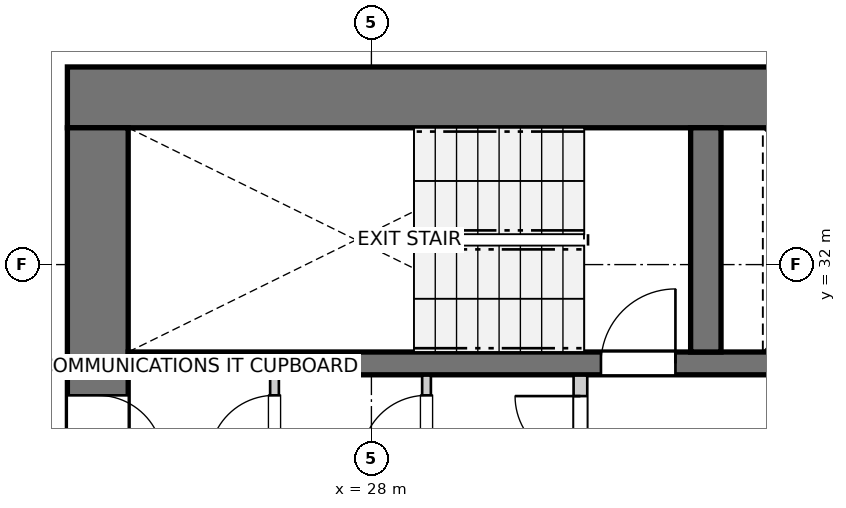
"""IFC4 building model, lengths in metres.
Left out: names, types, materials, properties, quantities, classifications, styles, units other than length and angle.
Written with IfcOpenShell. Run it as: python <this file> out.ifc"""

import sys

from ifc_helpers import new_model, si_unit, direction, frame, frame_2d, origin, place, context, subcontext, project, spatial, rectangle, extrude, source, transform, mapped, element, fill, save


model = new_model("IFC4")
c1 = context("Model", 3, precision=1e-05, world=origin(), true_north=direction((0.0, 1.0)))
c2 = subcontext(c1, "Body", "Model", "MODEL_VIEW")
j1 = project(units=[si_unit("LENGTHUNIT", "METRE"), si_unit("PLANEANGLEUNIT", "RADIAN")], contexts=[c1])
p1 = place(None, origin())
s1 = spatial("IfcSite", under=j1, at=p1, CompositionType="ELEMENT")
p2 = place(p1, origin())
s2 = spatial("IfcBuilding", under=s1, at=p2, CompositionType="ELEMENT")
p3 = place(p2, frame((0.0, 0.0, 27.0)))
s3 = spatial("IfcBuildingStorey", under=s2, at=p3, CompositionType="ELEMENT", Elevation=27.0)
p4 = place(p3, frame((36.7, 34.2, 0.0), z_axis=(0.0, 0.0, 1.0), x_axis=(-1.0, 0.0, 0.0)))
e1 = element("IfcWall", 1, at=p4, inside=s3, PredefinedType="SHEAR", context=c2, shape_type="SweptSolid", body=[
    extrude(rectangle(XDim=12.7, YDim=0.8, at=frame_2d((6.35, 0.0))), origin(), (0.0, 0.0, 1.0), 2.935),
])
p5 = place(p3, frame((24.4, 33.8, 0.0), z_axis=(0.0, 0.0, 1.0), x_axis=(0.0, -1.0, 0.0)))
e2 = element("IfcWall", 2, at=p5, inside=s3, PredefinedType="SHEAR", context=c2, shape_type="SweptSolid", body=[
    extrude(rectangle(XDim=15.6, YDim=0.8, at=frame_2d((7.8, 0.0))), origin(), (0.0, 0.0, 1.0), 2.935),
])
p6 = place(p5, frame((7.05, 0.0, 0.0)))
e3 = element("IfcOpeningElement", 3, at=p6, cuts=e2, PredefinedType="OPENING", context=c2, shape_type="SweptSolid", body=[
    extrude(rectangle(XDim=1.5, YDim=2.15, at=frame_2d((0.75, 1.075))), frame((0.0, 0.41, 0.0), z_axis=(0.0, -1.0, 0.0), x_axis=(1.0, 0.0, 0.0)), (0.0, 0.0, 1.0), 0.82),
])
p7 = place(p5, frame((3.52, 0.0, 0.0)))
e4 = element("IfcOpeningElement", 4, at=p7, cuts=e2, PredefinedType="OPENING", context=c2, shape_type="SweptSolid", body=[
    extrude(rectangle(XDim=0.86, YDim=2.05, at=frame_2d((0.43, 1.025))), frame((0.0, 0.41, 0.0), z_axis=(0.0, -1.0, 0.0), x_axis=(1.0, 0.0, 0.0)), (0.0, 0.0, 1.0), 0.82),
])
p8 = place(p5, frame((11.22, 0.0, 0.0)))
e5 = element("IfcOpeningElement", 5, at=p8, cuts=e2, PredefinedType="OPENING", context=c2, shape_type="SweptSolid", body=[
    extrude(rectangle(XDim=0.86, YDim=2.05, at=frame_2d((0.43, 1.025))), frame((0.0, 0.41, 0.0), z_axis=(0.0, -1.0, 0.0), x_axis=(1.0, 0.0, 0.0)), (0.0, 0.0, 1.0), 0.82),
])
p9 = place(p3, frame((24.8, 30.7, 0.0), z_axis=(0.0, 0.0, 1.0), x_axis=(1.0, 0.0, 0.0)))
e6 = element("IfcWall", 6, at=p9, inside=s3, PredefinedType="SHEAR", context=c2, shape_type="SweptSolid", body=[
    extrude(rectangle(XDim=11.1, YDim=0.3, at=frame_2d((5.55, 0.0))), origin(), (0.0, 0.0, 1.0), 2.935),
])
p10 = place(p9, frame((6.22, 0.0, 0.0)))
e7 = element("IfcOpeningElement", 7, at=p10, cuts=e6, PredefinedType="OPENING", context=c2, shape_type="SweptSolid", body=[
    extrude(rectangle(XDim=0.98, YDim=2.15, at=frame_2d((0.49, 1.075))), frame((0.0, 0.16, 0.0), z_axis=(0.0, -1.0, 0.0), x_axis=(1.0, 0.0, 0.0)), (0.0, 0.0, 1.0), 0.32),
])
p11 = place(p9, frame((9.15, 0.0, 0.0)))
e8 = element("IfcOpeningElement", 8, at=p11, cuts=e6, PredefinedType="OPENING", context=c2, shape_type="SweptSolid", body=[
    extrude(rectangle(XDim=1.15, YDim=2.15, at=frame_2d((0.575, 1.075))), frame((0.0, 0.16, 0.0), z_axis=(0.0, -1.0, 0.0), x_axis=(1.0, 0.0, 0.0)), (0.0, 0.0, 1.0), 0.32),
])
p12 = place(p3, frame((32.4, 30.85, 0.0), z_axis=(0.0, 0.0, 1.0), x_axis=(0.0, 1.0, 0.0)))
e9 = element("IfcWall", 9, at=p12, inside=s3, PredefinedType="SHEAR", context=c2, shape_type="SweptSolid", body=[
    extrude(rectangle(XDim=2.95, YDim=0.4, at=frame_2d((1.475, 0.0))), origin(), (0.0, 0.0, 1.0), 2.935),
])
p13 = place(p3, frame((30.75, 27.43, 0.0), z_axis=(0.0, 0.0, 1.0), x_axis=(0.0, 1.0, 0.0)))
e10 = element("IfcWall", 10, at=p13, inside=s3, PredefinedType="PARTITIONING", context=c2, shape_type="SweptSolid", body=[
    extrude(rectangle(XDim=3.11, YDim=0.18, at=frame_2d((1.555, 0.0))), origin(), (0.0, 0.0, 1.0), 2.935),
])
p14 = place(p13, frame((1.98, 0.0, 0.0)))
e11 = element("IfcOpeningElement", 11, at=p14, cuts=e10, PredefinedType="OPENING", context=c2, shape_type="SweptSolid", body=[
    extrude(rectangle(XDim=0.86, YDim=2.05, at=frame_2d((0.43, 1.025))), frame((0.0, 0.1, 0.0), z_axis=(0.0, -1.0, 0.0), x_axis=(1.0, 0.0, 0.0)), (0.0, 0.0, 1.0), 0.2),
])
p15 = place(p3, frame((26.725, 29.16, 0.0), z_axis=(0.0, 0.0, 1.0), x_axis=(0.0, 1.0, 0.0)))
e12 = element("IfcWall", 12, at=p15, inside=s3, PredefinedType="PARTITIONING", context=c2, shape_type="SweptSolid", body=[
    extrude(rectangle(XDim=1.38, YDim=0.115, at=frame_2d((0.69, 0.0))), origin(), (0.0, 0.0, 1.0), 2.935),
])
p16 = place(p15, frame((0.26, 0.0, 0.0)))
e13 = element("IfcOpeningElement", 13, at=p16, cuts=e12, PredefinedType="OPENING", context=c2, shape_type="SweptSolid", body=[
    extrude(rectangle(XDim=0.86, YDim=2.05, at=frame_2d((0.43, 1.025))), frame((0.0, 0.067, 0.0), z_axis=(0.0, -1.0, 0.0), x_axis=(1.0, 0.0, 0.0)), (0.0, 0.0, 1.0), 0.135),
])
p17 = place(p3, frame((28.725, 29.16, 0.0), z_axis=(0.0, 0.0, 1.0), x_axis=(0.0, 1.0, 0.0)))
e14 = element("IfcWall", 14, at=p17, inside=s3, PredefinedType="PARTITIONING", context=c2, shape_type="SweptSolid", body=[
    extrude(rectangle(XDim=1.38, YDim=0.115, at=frame_2d((0.69, 0.0))), origin(), (0.0, 0.0, 1.0), 2.935),
])
p18 = place(p17, frame((0.26, 0.0, 0.0)))
e15 = element("IfcOpeningElement", 15, at=p18, cuts=e14, PredefinedType="OPENING", context=c2, shape_type="SweptSolid", body=[
    extrude(rectangle(XDim=0.86, YDim=2.05, at=frame_2d((0.43, 1.025))), frame((0.0, 0.067, 0.0), z_axis=(0.0, -1.0, 0.0), x_axis=(1.0, 0.0, 0.0)), (0.0, 0.0, 1.0), 0.135),
])
m1 = source(origin(), c2, "Body", "SweptSolid", [
    extrude(rectangle(XDim=0.98, YDim=2.15, at=frame_2d((0.49, 1.075))), frame((0.0, 0.025, 0.0), z_axis=(0.0, -1.0, 0.0), x_axis=(1.0, 0.0, 0.0)), (0.0, 0.0, 1.0), 0.05),
])
p19 = place(p10, origin())
e16 = element("IfcDoor", 16, at=p19, inside=s3, OperationType="SINGLE_SWING_RIGHT", PredefinedType="DOOR", context=c2, shape_type="MappedRepresentation", body=[
    mapped(m1, transform((0.0, 0.0, 0.0), x_axis=(1.0, 0.0, 0.0), y_axis=(0.0, 1.0, 0.0), z_axis=(0.0, 0.0, 1.0), scale=1.0)),
])
fill(e7, e16)
m2 = source(origin(), c2, "Body", "SweptSolid", [
    extrude(rectangle(XDim=0.86, YDim=2.05, at=frame_2d((0.43, 1.025))), frame((0.0, 0.025, 0.0), z_axis=(0.0, -1.0, 0.0), x_axis=(1.0, 0.0, 0.0)), (0.0, 0.0, 1.0), 0.05),
])
p20 = place(p7, origin())
e17 = element("IfcDoor", 17, at=p20, inside=s3, OperationType="SINGLE_SWING_RIGHT", PredefinedType="DOOR", context=c2, shape_type="MappedRepresentation", body=[
    mapped(m2, transform((0.0, 0.0, 0.0), x_axis=(1.0, 0.0, 0.0), y_axis=(0.0, 1.0, 0.0), z_axis=(0.0, 0.0, 1.0), scale=1.0)),
])
fill(e4, e17)
p21 = place(p14, origin())
e18 = element("IfcDoor", 18, at=p21, inside=s3, OperationType="SINGLE_SWING_RIGHT", PredefinedType="DOOR", context=c2, shape_type="MappedRepresentation", body=[
    mapped(m2, transform((0.0, 0.0, 0.0), x_axis=(1.0, 0.0, 0.0), y_axis=(0.0, 1.0, 0.0), z_axis=(0.0, 0.0, 1.0), scale=1.0)),
])
fill(e11, e18)
p22 = place(p16, origin())
e19 = element("IfcDoor", 19, at=p22, inside=s3, OperationType="SINGLE_SWING_LEFT", PredefinedType="DOOR", context=c2, shape_type="MappedRepresentation", body=[
    mapped(m2, transform((0.0, 0.0, 0.0), x_axis=(1.0, 0.0, 0.0), y_axis=(0.0, 1.0, 0.0), z_axis=(0.0, 0.0, 1.0), scale=1.0)),
])
fill(e13, e19)
p23 = place(p18, origin())
e20 = element("IfcDoor", 20, at=p23, inside=s3, OperationType="SINGLE_SWING_LEFT", PredefinedType="DOOR", context=c2, shape_type="MappedRepresentation", body=[
    mapped(m2, transform((0.0, 0.0, 0.0), x_axis=(1.0, 0.0, 0.0), y_axis=(0.0, 1.0, 0.0), z_axis=(0.0, 0.0, 1.0), scale=1.0)),
])
fill(e15, e20)
save(model, sys.argv[1])
